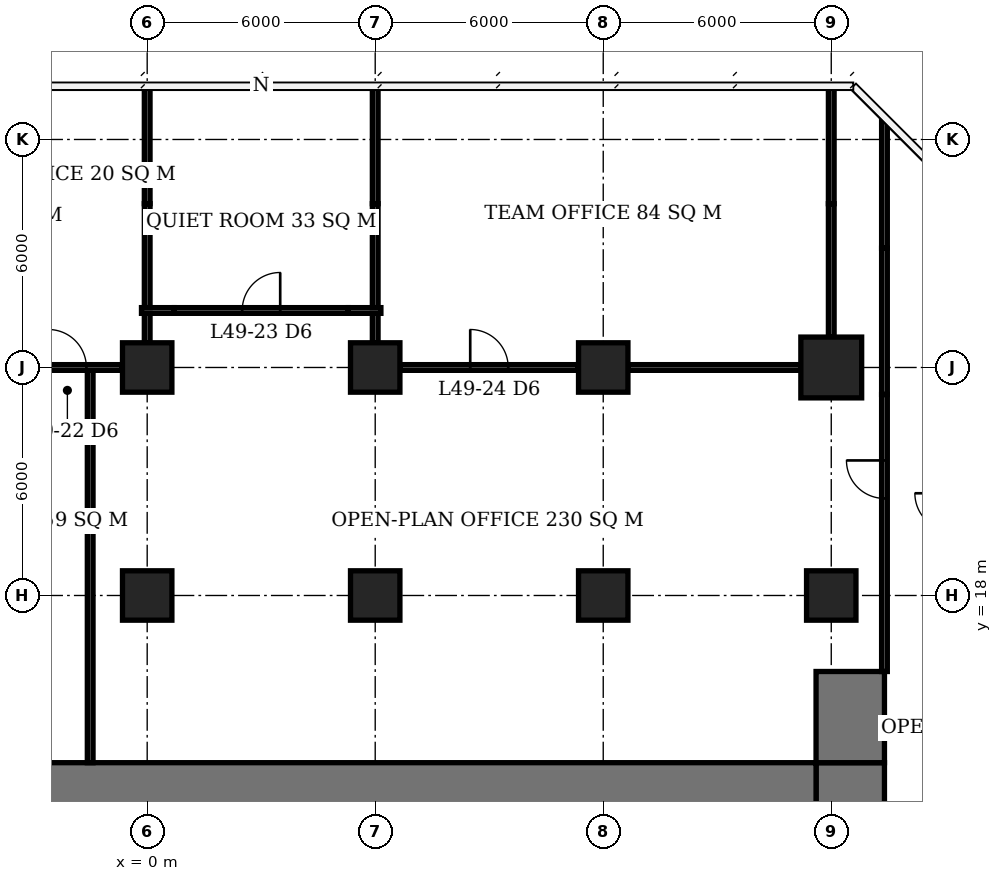
"""IFC4 building model, lengths in metres.
Left out: names, types, materials, properties, quantities, classifications, styles, units other than length and angle.
Written with IfcOpenShell. Run it as: python <this file> out.ifc"""

import sys

from ifc_helpers import new_model, si_unit, direction, frame, frame_2d, origin, origin_2d, place, context, subcontext, project, spatial, rectangle, extrude, element, fill, save


model = new_model("IFC4")
c1 = context("Model", 3, precision=1e-05, world=origin(), true_north=direction((0.0, 1.0)))
c2 = subcontext(c1, "Body", "Model", "MODEL_VIEW")
j1 = project(units=[si_unit("LENGTHUNIT", "METRE"), si_unit("PLANEANGLEUNIT", "RADIAN")], contexts=[c1])
p1 = place(None, origin())
s1 = spatial("IfcSite", under=j1, at=p1, CompositionType="ELEMENT")
p2 = place(p1, origin())
s2 = spatial("IfcBuilding", under=s1, at=p2, CompositionType="ELEMENT")
p3 = place(p2, frame((0.0, 0.0, 200.6)))
s3 = spatial("IfcBuildingStorey", under=s2, at=p3, CompositionType="ELEMENT", Elevation=200.6)
for number, where, z_axis, x_axis in (
    (1, (0.0, 18.0, 0.0), (0.0, 0.0, 1.0), (1.0, 0.0, 0.0)),
    (2, (0.0, 24.0, 0.0), (0.0, 0.0, 1.0), (1.0, 0.0, 0.0)),
    (3, (6.0, 18.0, 0.0), (0.0, 0.0, 1.0), (1.0, 0.0, 0.0)),
    (4, (6.0, 24.0, 0.0), (0.0, 0.0, 1.0), (1.0, 0.0, 0.0)),
    (5, (12.0, 18.0, 0.0), (0.0, 0.0, 1.0), (1.0, 0.0, 0.0)),
    (6, (12.0, 24.0, 0.0), (0.0, 0.0, 1.0), (1.0, 0.0, 0.0)),
    (7, (18.0, 18.0, 0.0), (0.0, 0.0, 1.0), (1.0, 0.0, 0.0)),
):
    element("IfcColumn", number, at=place(p3, frame(where, z_axis=z_axis, x_axis=x_axis)), inside=s3, PredefinedType="COLUMN", context=c2, shape_type="SweptSolid", body=[
        extrude(rectangle(XDim=1.3, YDim=1.3, at=origin_2d()), origin(), (0.0, 0.0, 1.0), 3.9),
    ])
p4 = place(p3, frame((18.0, 24.0, 0.0), z_axis=(0.0, 0.0, 1.0), x_axis=(1.0, 0.0, 0.0)))
e8 = element("IfcColumn", 8, at=p4, inside=s3, PredefinedType="COLUMN", context=c2, shape_type="SweptSolid", body=[
    extrude(rectangle(XDim=1.6, YDim=1.6, at=origin_2d()), origin(), (0.0, 0.0, 1.0), 3.9),
])
p5 = place(p3, frame((-5.6, 12.6, 0.0), z_axis=(0.0, 0.0, 1.0), x_axis=(1.0, 0.0, 0.0)))
e9 = element("IfcWall", 9, at=p5, inside=s3, PredefinedType="SHEAR", context=c2, shape_type="SweptSolid", body=[
    extrude(rectangle(XDim=23.2, YDim=2.0, at=frame_2d((11.6, 0.0))), origin(), (0.0, 0.0, 1.0), 3.9),
])
p6 = place(p3, frame((18.5, -7.6, 0.0), z_axis=(0.0, 0.0, 1.0), x_axis=(0.0, 1.0, 0.0)))
e10 = element("IfcWall", 10, at=p6, inside=s3, PredefinedType="SHEAR", context=c2, shape_type="SweptSolid", body=[
    extrude(rectangle(XDim=21.2, YDim=1.8, at=frame_2d((10.6, 0.0))), origin(), (0.0, 0.0, 1.0), 3.9),
])
p7 = place(p6, frame((9.2, 0.0, 0.0)))
e11 = element("IfcOpeningElement", 11, at=p7, cuts=e10, PredefinedType="OPENING", context=c2, shape_type="SweptSolid", body=[
    extrude(rectangle(XDim=1.8, YDim=2.4, at=frame_2d((0.9, 1.2))), frame((0.0, 0.91, 0.0), z_axis=(0.0, -1.0, 0.0), x_axis=(1.0, 0.0, 0.0)), (0.0, 0.0, 1.0), 1.82),
])
p8 = place(p3, frame((18.5, 13.6, 0.0), z_axis=(0.0, 0.0, 1.0), x_axis=(0.0, 1.0, 0.0)))
e12 = element("IfcWall", 12, at=p8, inside=s3, PredefinedType="SHEAR", context=c2, shape_type="SweptSolid", body=[
    extrude(rectangle(XDim=2.4, YDim=1.8, at=frame_2d((1.2, 0.0))), origin(), (0.0, 0.0, 1.0), 3.9),
])
p9 = place(p3, frame((-2.925, 24.0, 0.0), z_axis=(0.0, 0.0, 1.0), x_axis=(1.0, 0.0, 0.0)))
e13 = element("IfcWall", 13, at=p9, inside=s3, PredefinedType="PARTITIONING", context=c2, shape_type="SweptSolid", body=[
    extrude(rectangle(XDim=2.265, YDim=0.15, at=frame_2d((1.133, 0.0))), origin(), (0.0, 0.0, 1.0), 3.65),
])
p10 = place(p9, frame((0.325, 0.0, 0.0)))
e14 = element("IfcOpeningElement", 14, at=p10, cuts=e13, PredefinedType="OPENING", context=c2, shape_type="SweptSolid", body=[
    extrude(rectangle(XDim=1.0, YDim=2.1, at=frame_2d((0.5, 1.05))), frame((0.0, 0.085, 0.0), z_axis=(0.0, -1.0, 0.0), x_axis=(1.0, 0.0, 0.0)), (0.0, 0.0, 1.0), 0.17),
])
p11 = place(p3, frame((6.66, 24.0, 0.0), z_axis=(0.0, 0.0, 1.0), x_axis=(1.0, 0.0, 0.0)))
e15 = element("IfcWall", 15, at=p11, inside=s3, PredefinedType="PARTITIONING", context=c2, shape_type="SweptSolid", body=[
    extrude(rectangle(XDim=4.68, YDim=0.15, at=frame_2d((2.34, 0.0))), origin(), (0.0, 0.0, 1.0), 3.65),
])
p12 = place(p11, frame((1.84, 0.0, 0.0)))
e16 = element("IfcOpeningElement", 16, at=p12, cuts=e15, PredefinedType="OPENING", context=c2, shape_type="SweptSolid", body=[
    extrude(rectangle(XDim=1.0, YDim=2.1, at=frame_2d((0.5, 1.05))), frame((0.0, 0.085, 0.0), z_axis=(0.0, -1.0, 0.0), x_axis=(1.0, 0.0, 0.0)), (0.0, 0.0, 1.0), 0.17),
])
p13 = place(p3, frame((12.66, 24.0, 0.0), z_axis=(0.0, 0.0, 1.0), x_axis=(1.0, 0.0, 0.0)))
e17 = element("IfcWall", 17, at=p13, inside=s3, PredefinedType="PARTITIONING", context=c2, shape_type="SweptSolid", body=[
    extrude(rectangle(XDim=4.54, YDim=0.15, at=frame_2d((2.27, 0.0))), origin(), (0.0, 0.0, 1.0), 3.65),
])
p14 = place(p3, frame((-0.15, 25.5, 0.0), z_axis=(0.0, 0.0, 1.0), x_axis=(1.0, 0.0, 0.0)))
e18 = element("IfcWall", 18, at=p14, inside=s3, PredefinedType="PARTITIONING", context=c2, shape_type="SweptSolid", body=[
    extrude(rectangle(XDim=0.86, YDim=0.15, at=frame_2d((0.43, 0.0))), origin(), (0.0, 0.0, 1.0), 2.65),
])
p15 = place(p3, frame((0.71, 25.5, 0.0), z_axis=(0.0, 0.0, 1.0), x_axis=(1.0, 0.0, 0.0)))
e19 = element("IfcWall", 19, at=p15, inside=s3, PredefinedType="PARTITIONING", context=c2, shape_type="SweptSolid", body=[
    extrude(rectangle(XDim=4.58, YDim=0.15, at=frame_2d((2.29, 0.0))), origin(), (0.0, 0.0, 1.0), 3.65),
])
p16 = place(p15, frame((1.79, 0.0, 0.0)))
e20 = element("IfcOpeningElement", 20, at=p16, cuts=e19, PredefinedType="OPENING", context=c2, shape_type="SweptSolid", body=[
    extrude(rectangle(XDim=1.0, YDim=2.1, at=frame_2d((0.5, 1.05))), frame((0.0, 0.085, 0.0), z_axis=(0.0, -1.0, 0.0), x_axis=(1.0, 0.0, 0.0)), (0.0, 0.0, 1.0), 0.17),
])
p17 = place(p3, frame((5.29, 25.5, 0.0), z_axis=(0.0, 0.0, 1.0), x_axis=(1.0, 0.0, 0.0)))
e21 = element("IfcWall", 21, at=p17, inside=s3, PredefinedType="PARTITIONING", context=c2, shape_type="SweptSolid", body=[
    extrude(rectangle(XDim=0.86, YDim=0.15, at=frame_2d((0.43, 0.0))), origin(), (0.0, 0.0, 1.0), 2.65),
])
p18 = place(p3, frame((0.0, 24.65, 0.0), z_axis=(0.0, 0.0, 1.0), x_axis=(0.0, 1.0, 0.0)))
e22 = element("IfcWall", 22, at=p18, inside=s3, PredefinedType="PARTITIONING", context=c2, shape_type="SweptSolid", body=[
    extrude(rectangle(XDim=0.775, YDim=0.15, at=frame_2d((0.388, 0.0))), origin(), (0.0, 0.0, 1.0), 2.65),
])
p19 = place(p3, frame((0.0, 25.575, 0.0), z_axis=(0.0, 0.0, 1.0), x_axis=(0.0, 1.0, 0.0)))
e23 = element("IfcWall", 23, at=p19, inside=s3, PredefinedType="PARTITIONING", context=c2, shape_type="SweptSolid", body=[
    extrude(rectangle(XDim=2.735, YDim=0.15, at=frame_2d((1.368, 0.0))), origin(), (0.0, 0.0, 1.0), 2.65),
])
p20 = place(p3, frame((0.0, 28.31, 0.0), z_axis=(0.0, 0.0, 1.0), x_axis=(0.0, 1.0, 0.0)))
e24 = element("IfcWall", 24, at=p20, inside=s3, PredefinedType="PARTITIONING", context=c2, shape_type="SweptSolid", body=[
    extrude(rectangle(XDim=3.04, YDim=0.15, at=frame_2d((1.52, 0.0))), origin(), (0.0, 0.0, 1.0), 3.65),
])
p21 = place(p3, frame((6.0, 24.65, 0.0), z_axis=(0.0, 0.0, 1.0), x_axis=(0.0, 1.0, 0.0)))
e25 = element("IfcWall", 25, at=p21, inside=s3, PredefinedType="PARTITIONING", context=c2, shape_type="SweptSolid", body=[
    extrude(rectangle(XDim=0.775, YDim=0.15, at=frame_2d((0.388, 0.0))), origin(), (0.0, 0.0, 1.0), 2.65),
])
p22 = place(p3, frame((6.0, 25.575, 0.0), z_axis=(0.0, 0.0, 1.0), x_axis=(0.0, 1.0, 0.0)))
e26 = element("IfcWall", 26, at=p22, inside=s3, PredefinedType="PARTITIONING", context=c2, shape_type="SweptSolid", body=[
    extrude(rectangle(XDim=2.735, YDim=0.15, at=frame_2d((1.368, 0.0))), origin(), (0.0, 0.0, 1.0), 2.65),
])
p23 = place(p3, frame((6.0, 28.31, 0.0), z_axis=(0.0, 0.0, 1.0), x_axis=(0.0, 1.0, 0.0)))
e27 = element("IfcWall", 27, at=p23, inside=s3, PredefinedType="PARTITIONING", context=c2, shape_type="SweptSolid", body=[
    extrude(rectangle(XDim=3.04, YDim=0.15, at=frame_2d((1.52, 0.0))), origin(), (0.0, 0.0, 1.0), 3.65),
])
p24 = place(p3, frame((18.0, 24.8, 0.0), z_axis=(0.0, 0.0, 1.0), x_axis=(0.0, 1.0, 0.0)))
e28 = element("IfcWall", 28, at=p24, inside=s3, PredefinedType="PARTITIONING", context=c2, shape_type="SweptSolid", body=[
    extrude(rectangle(XDim=3.51, YDim=0.15, at=frame_2d((1.755, 0.0))), origin(), (0.0, 0.0, 1.0), 2.65),
])
p25 = place(p3, frame((18.0, 28.31, 0.0), z_axis=(0.0, 0.0, 1.0), x_axis=(0.0, 1.0, 0.0)))
e29 = element("IfcWall", 29, at=p25, inside=s3, PredefinedType="PARTITIONING", context=c2, shape_type="SweptSolid", body=[
    extrude(rectangle(XDim=3.09, YDim=0.15, at=frame_2d((1.545, 0.0))), origin(), (0.0, 0.0, 1.0), 3.65),
])
p26 = place(p3, frame((-1.5, 13.6, 0.0), z_axis=(0.0, 0.0, 1.0), x_axis=(0.0, 1.0, 0.0)))
e30 = element("IfcWall", 30, at=p26, inside=s3, PredefinedType="PARTITIONING", context=c2, shape_type="SweptSolid", body=[
    extrude(rectangle(XDim=10.325, YDim=0.15, at=frame_2d((5.163, 0.0))), origin(), (0.0, 0.0, 1.0), 3.65),
])
p27 = place(p3, frame((19.4, 16.0, 0.0), z_axis=(0.0, 0.0, 1.0), x_axis=(0.0, 1.0, 0.0)))
e31 = element("IfcWall", 31, at=p27, inside=s3, PredefinedType="PARTITIONING", context=c2, shape_type="SweptSolid", body=[
    extrude(rectangle(XDim=7.29, YDim=0.15, at=frame_2d((3.645, 0.0))), origin(), (0.0, 0.0, 1.0), 3.65),
])
p28 = place(p27, frame((4.554, 0.0, 0.0)))
e32 = element("IfcOpeningElement", 32, at=p28, cuts=e31, PredefinedType="OPENING", context=c2, shape_type="SweptSolid", body=[
    extrude(rectangle(XDim=1.0, YDim=2.1, at=frame_2d((0.5, 1.05))), frame((0.0, 0.085, 0.0), z_axis=(0.0, -1.0, 0.0), x_axis=(1.0, 0.0, 0.0)), (0.0, 0.0, 1.0), 0.17),
])
p29 = place(p3, frame((19.4, 23.29, 0.0), z_axis=(0.0, 0.0, 1.0), x_axis=(0.0, 1.0, 0.0)))
e33 = element("IfcWall", 33, at=p29, inside=s3, PredefinedType="PARTITIONING", context=c2, shape_type="SweptSolid", body=[
    extrude(rectangle(XDim=3.85, YDim=0.15, at=frame_2d((1.925, 0.0))), origin(), (0.0, 0.0, 1.0), 2.65),
])
p30 = place(p3, frame((19.4, 27.14, 0.0), z_axis=(0.0, 0.0, 1.0), x_axis=(0.0, 1.0, 0.0)))
e34 = element("IfcWall", 34, at=p30, inside=s3, PredefinedType="PARTITIONING", context=c2, shape_type="SweptSolid", body=[
    extrude(rectangle(XDim=3.349, YDim=0.15, at=frame_2d((1.675, 0.0))), origin(), (0.0, 0.0, 1.0), 3.65),
])
p31 = place(p10, origin())
e35 = element("IfcDoor", 35, at=p31, inside=s3, OperationType="SINGLE_SWING_LEFT", PredefinedType="DOOR", context=c2, shape_type="SweptSolid", body=[
    extrude(rectangle(XDim=1.0, YDim=2.1, at=frame_2d((0.5, 1.05))), frame((0.0, 0.025, 0.0), z_axis=(0.0, -1.0, 0.0), x_axis=(1.0, 0.0, 0.0)), (0.0, 0.0, 1.0), 0.05),
])
fill(e14, e35)
p32 = place(p16, origin())
e36 = element("IfcDoor", 36, at=p32, inside=s3, OperationType="SINGLE_SWING_RIGHT", PredefinedType="DOOR", context=c2, shape_type="SweptSolid", body=[
    extrude(rectangle(XDim=1.0, YDim=2.1, at=frame_2d((0.5, 1.05))), frame((0.0, 0.025, 0.0), z_axis=(0.0, -1.0, 0.0), x_axis=(1.0, 0.0, 0.0)), (0.0, 0.0, 1.0), 0.05),
])
fill(e20, e36)
p33 = place(p12, origin())
e37 = element("IfcDoor", 37, at=p33, inside=s3, OperationType="SINGLE_SWING_LEFT", PredefinedType="DOOR", context=c2, shape_type="SweptSolid", body=[
    extrude(rectangle(XDim=1.0, YDim=2.1, at=frame_2d((0.5, 1.05))), frame((0.0, 0.025, 0.0), z_axis=(0.0, -1.0, 0.0), x_axis=(1.0, 0.0, 0.0)), (0.0, 0.0, 1.0), 0.05),
])
fill(e16, e37)
p34 = place(p28, origin())
e38 = element("IfcDoor", 38, at=p34, inside=s3, OperationType="SINGLE_SWING_RIGHT", PredefinedType="DOOR", context=c2, shape_type="SweptSolid", body=[
    extrude(rectangle(XDim=1.0, YDim=2.1, at=frame_2d((0.5, 1.05))), frame((0.0, 0.025, 0.0), z_axis=(0.0, -1.0, 0.0), x_axis=(1.0, 0.0, 0.0)), (0.0, 0.0, 1.0), 0.05),
])
fill(e32, e38)
save(model, sys.argv[1])
